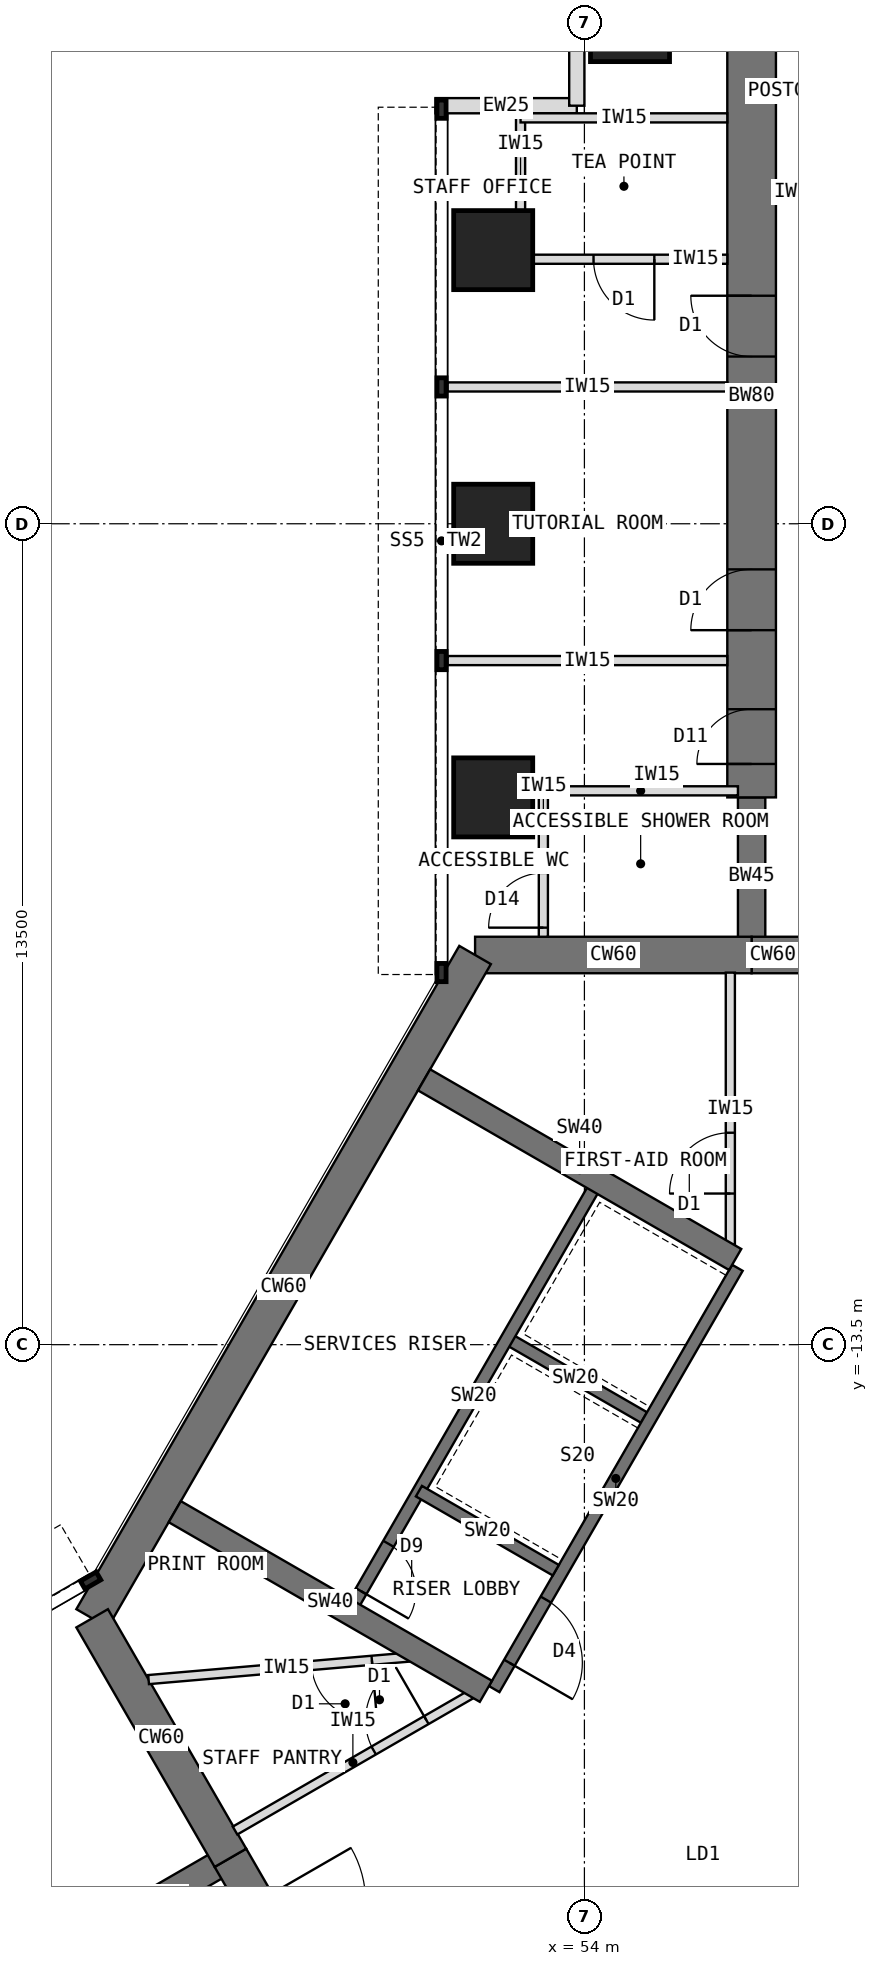
"""IFC4 building model, lengths in metres.
Left out: names, types, materials, properties, quantities, classifications, styles, units other than length and angle.
Written with IfcOpenShell. Run it as: python <this file> out.ifc"""

import sys

from ifc_helpers import new_model, si_unit, direction, frame, frame_2d, origin, origin_2d, place, context, subcontext, project, spatial, rectangle, extrude, element, fill, save


model = new_model("IFC4")
c1 = context("Model", 3, precision=1e-05, world=origin(), true_north=direction((0.0, 1.0)))
c2 = subcontext(c1, "Body", "Model", "MODEL_VIEW")
j1 = project(units=[si_unit("LENGTHUNIT", "METRE"), si_unit("PLANEANGLEUNIT", "RADIAN")], contexts=[c1])
p1 = place(None, origin())
s1 = spatial("IfcSite", under=j1, at=p1, CompositionType="ELEMENT")
p2 = place(p1, origin())
s2 = spatial("IfcBuilding", under=s1, at=p2, CompositionType="ELEMENT")
p3 = place(p2, frame((0.0, 0.0, 133.5)))
s3 = spatial("IfcBuildingStorey", under=s2, at=p3, CompositionType="ELEMENT", Elevation=133.5)
p4 = place(p3, frame((60.25, -7.092, 0.0), z_axis=(0.0, 0.0, 1.0), x_axis=(-1.0, 0.0, 0.0)))
e1 = element("IfcWall", 1, at=p4, inside=s3, PredefinedType="SHEAR", context=c2, shape_type="SweptSolid", body=[
    extrude(rectangle(XDim=3.5, YDim=0.6, at=frame_2d((1.75, 0.0))), origin(), (0.0, 0.0, 1.0), 4.0),
])
p5 = place(p4, frame((0.85, 0.0, 0.0)))
e2 = element("IfcOpeningElement", 2, at=p5, cuts=e1, PredefinedType="OPENING", context=c2, shape_type="SweptSolid", body=[
    extrude(rectangle(XDim=1.8, YDim=2.1, at=frame_2d((0.9, 1.05))), frame((0.0, 0.31, 0.0), z_axis=(0.0, -1.0, 0.0), x_axis=(1.0, 0.0, 0.0)), (0.0, 0.0, 1.0), 0.62),
])
p6 = place(p3, frame((56.75, -7.092, 0.0), z_axis=(0.0, 0.0, 1.0), x_axis=(-1.0, 0.0, 0.0)))
e3 = element("IfcWall", 3, at=p6, inside=s3, PredefinedType="SHEAR", context=c2, shape_type="SweptSolid", body=[
    extrude(rectangle(XDim=4.548, YDim=0.6, at=frame_2d((2.274, 0.0))), origin(), (0.0, 0.0, 1.0), 4.0),
])
p7 = place(p3, frame((52.202, -7.092, 0.0), z_axis=(0.0, 0.0, 1.0), x_axis=(-0.500005998175, -0.866021940709, 0.0)))
e4 = element("IfcWall", 4, at=p7, inside=s3, PredefinedType="SHEAR", context=c2, shape_type="SweptSolid", body=[
    extrude(rectangle(XDim=12.596, YDim=0.6, at=frame_2d((6.298, 0.0))), origin(), (0.0, 0.0, 1.0), 4.0),
])
p8 = place(p3, frame((45.904, -18.0, 0.0), z_axis=(0.0, 0.0, 1.0), x_axis=(0.500024481964, -0.866011268655, 0.0)))
e5 = element("IfcWall", 5, at=p8, inside=s3, PredefinedType="SHEAR", context=c2, shape_type="SweptSolid", body=[
    extrude(rectangle(XDim=4.548, YDim=0.6, at=frame_2d((2.274, 0.0))), origin(), (0.0, 0.0, 1.0), 4.0),
])
p9 = place(p3, frame((48.178, -21.939, 0.0), z_axis=(0.0, 0.0, 1.0), x_axis=(0.500010275428, -0.866019471182, 0.0)))
e6 = element("IfcWall", 6, at=p9, inside=s3, PredefinedType="SHEAR", context=c2, shape_type="SweptSolid", body=[
    extrude(rectangle(XDim=3.5, YDim=0.6, at=frame_2d((1.75, 0.0))), origin(), (0.0, 0.0, 1.0), 4.0),
])
p10 = place(p9, frame((0.85, 0.0, 0.0)))
e7 = element("IfcOpeningElement", 7, at=p10, cuts=e6, PredefinedType="OPENING", context=c2, shape_type="SweptSolid", body=[
    extrude(rectangle(XDim=1.8, YDim=2.1, at=frame_2d((0.9, 1.05))), frame((0.0, 0.31, 0.0), z_axis=(0.0, -1.0, 0.0), x_axis=(1.0, 0.0, 0.0)), (0.0, 0.0, 1.0), 0.62),
])
p11 = place(p3, frame((56.75, -7.092, 0.0), z_axis=(0.0, 0.0, 1.0), x_axis=(0.0, 1.0, 0.0)))
e8 = element("IfcWall", 8, at=p11, inside=s3, PredefinedType="SHEAR", context=c2, shape_type="SweptSolid", body=[
    extrude(rectangle(XDim=2.592, YDim=0.45, at=frame_2d((1.296, 0.0))), origin(), (0.0, 0.0, 1.0), 4.0),
])
p12 = place(p3, frame((56.75, -4.5, 0.0), z_axis=(0.0, 0.0, 1.0), x_axis=(0.0, 1.0, 0.0)))
e9 = element("IfcWall", 9, at=p12, inside=s3, PredefinedType="SHEAR", context=c2, shape_type="SweptSolid", body=[
    extrude(rectangle(XDim=13.2, YDim=0.8, at=frame_2d((6.6, 0.0))), origin(), (0.0, 0.0, 1.0), 4.0),
])
p13 = place(p12, frame((0.55, 0.0, 0.0)))
e10 = element("IfcOpeningElement", 10, at=p13, cuts=e9, PredefinedType="OPENING", context=c2, shape_type="SweptSolid", body=[
    extrude(rectangle(XDim=0.9, YDim=2.1, at=frame_2d((0.45, 1.05))), frame((0.0, 0.41, 0.0), z_axis=(0.0, -1.0, 0.0), x_axis=(1.0, 0.0, 0.0)), (0.0, 0.0, 1.0), 0.82),
])
p14 = place(p12, frame((2.75, 0.0, 0.0)))
e11 = element("IfcOpeningElement", 11, at=p14, cuts=e9, PredefinedType="OPENING", context=c2, shape_type="SweptSolid", body=[
    extrude(rectangle(XDim=1.0, YDim=2.1, at=frame_2d((0.5, 1.05))), frame((0.0, 0.41, 0.0), z_axis=(0.0, -1.0, 0.0), x_axis=(1.0, 0.0, 0.0)), (0.0, 0.0, 1.0), 0.82),
])
p15 = place(p12, frame((7.25, 0.0, 0.0)))
e12 = element("IfcOpeningElement", 12, at=p15, cuts=e9, PredefinedType="OPENING", context=c2, shape_type="SweptSolid", body=[
    extrude(rectangle(XDim=1.0, YDim=2.1, at=frame_2d((0.5, 1.05))), frame((0.0, 0.41, 0.0), z_axis=(0.0, -1.0, 0.0), x_axis=(1.0, 0.0, 0.0)), (0.0, 0.0, 1.0), 0.82),
])
p16 = place(p3, frame((48.178, -21.939, 0.0), z_axis=(0.0, 0.0, 1.0), x_axis=(-0.866072649678, -0.499918158782, 0.0)))
e13 = element("IfcWall", 13, at=p16, inside=s3, PredefinedType="SHEAR", context=c2, shape_type="SweptSolid", body=[
    extrude(rectangle(XDim=2.592, YDim=0.45, at=frame_2d((1.296, 0.0))), origin(), (0.0, 0.0, 1.0), 4.0),
])
for number, where, z_axis, x_axis in (
    (14, (52.5, -4.5, 0.0), (0.0, 0.0, 1.0), (1.0, 0.0, 0.0)),
    (15, (52.5, 0.0, 0.0), (0.0, 0.0, 1.0), (1.0, 0.0, 0.0)),
    (16, (52.5, 4.5, 0.0), (0.0, 0.0, 1.0), (1.0, 0.0, 0.0)),
    (17, (54.75, 8.25, 0.0), (0.0, 0.0, 1.0), (1.0, 0.0, 0.0)),
):
    element("IfcColumn", number, at=place(p3, frame(where, z_axis=z_axis, x_axis=x_axis)), inside=s3, PredefinedType="COLUMN", context=c2, shape_type="SweptSolid", body=[
        extrude(rectangle(XDim=1.3, YDim=1.3, at=origin_2d()), origin(), (0.0, 0.0, 1.0), 4.0),
    ])
for number, where, z_axis, x_axis in (
    (18, (51.55, 6.875, 0.0), (0.0, 0.0, 1.0), (1.0, 0.0, 0.0)),
    (19, (53.875, 6.875, 0.0), (0.0, 0.0, 1.0), (0.0, 1.0, 0.0)),
):
    element("IfcWall", number, at=place(p3, frame(where, z_axis=z_axis, x_axis=x_axis)), inside=s3, PredefinedType="STANDARD", context=c2, shape_type="SweptSolid", body=[
        extrude(rectangle(XDim=2.325, YDim=0.25, at=frame_2d((1.163, 0.0))), origin(), (0.0, 0.0, 1.0), 3.8),
    ])
p17 = place(p3, frame((56.516, -12.236, 0.0), z_axis=(0.0, 0.0, 1.0), x_axis=(-0.49999894854, -0.866026010844, 0.0)))
e20 = element("IfcWall", 20, at=p17, inside=s3, PredefinedType="SHEAR", context=c2, shape_type="SweptSolid", body=[
    extrude(rectangle(XDim=8.0, YDim=0.2, at=frame_2d((4.0, 0.0))), origin(), (0.0, 0.0, 1.0), 4.0),
])
p18 = place(p17, frame((6.3, 0.0, 0.0)))
e21 = element("IfcOpeningElement", 21, at=p18, cuts=e20, PredefinedType="OPENING", context=c2, shape_type="SweptSolid", body=[
    extrude(rectangle(XDim=1.2, YDim=2.1, at=frame_2d((0.6, 1.05))), frame((0.0, 0.11, 0.0), z_axis=(0.0, -1.0, 0.0), x_axis=(1.0, 0.0, 0.0)), (0.0, 0.0, 1.0), 0.22),
])
for number, where, z_axis, x_axis in (
    (22, (54.98, -14.697, 0.0), (0.0, 0.0, 1.0), (-0.866, 0.5, 0.0)),
    (23, (53.53, -17.209, 0.0), (0.0, 0.0, 1.0), (-0.866, 0.5, 0.0)),
):
    element("IfcWall", number, at=place(p3, frame(where, z_axis=z_axis, x_axis=x_axis)), inside=s3, PredefinedType="SHEAR", context=c2, shape_type="SweptSolid", body=[
        extrude(rectangle(XDim=2.6, YDim=0.2, at=frame_2d((1.3, 0.0))), origin(), (0.0, 0.0, 1.0), 4.0),
    ])
p19 = place(p3, frame((54.178, -10.886, 0.0), z_axis=(0.0, 0.0, 1.0), x_axis=(-0.49999894854, -0.866026010844, 0.0)))
e24 = element("IfcWall", 24, at=p19, inside=s3, PredefinedType="SHEAR", context=c2, shape_type="SweptSolid", body=[
    extrude(rectangle(XDim=8.0, YDim=0.2, at=frame_2d((4.0, 0.0))), origin(), (0.0, 0.0, 1.0), 4.0),
])
p20 = place(p19, frame((6.8, 0.0, 0.0)))
e25 = element("IfcOpeningElement", 25, at=p20, cuts=e24, PredefinedType="OPENING", context=c2, shape_type="SweptSolid", body=[
    extrude(rectangle(XDim=0.9, YDim=2.1, at=frame_2d((0.45, 1.05))), frame((0.0, 0.11, 0.0), z_axis=(0.0, -1.0, 0.0), x_axis=(1.0, 0.0, 0.0)), (0.0, 0.0, 1.0), 0.22),
])
p21 = place(p3, frame((52.38, -19.201, 0.0), z_axis=(0.0, 0.0, 1.0), x_axis=(-0.866027317282, 0.49999668571, 0.0)))
e26 = element("IfcWall", 26, at=p21, inside=s3, PredefinedType="SHEAR", context=c2, shape_type="SweptSolid", body=[
    extrude(rectangle(XDim=5.908, YDim=0.4, at=frame_2d((2.954, 0.0))), origin(), (0.0, 0.0, 1.0), 4.0),
])
p22 = place(p3, frame((56.48, -12.099, 0.0), z_axis=(0.0, 0.0, 1.0), x_axis=(-0.866009424208, 0.500027676417, 0.0)))
e27 = element("IfcWall", 27, at=p22, inside=s3, PredefinedType="SHEAR", context=c2, shape_type="SweptSolid", body=[
    extrude(rectangle(XDim=5.908, YDim=0.4, at=frame_2d((2.954, 0.0))), origin(), (0.0, 0.0, 1.0), 4.0),
])
for number, where, z_axis, x_axis in (
    (28, (56.35, -2.25, 0.0), (0.0, 0.0, 1.0), (-1.0, 0.0, 0.0)),
    (29, (56.35, 2.25, 0.0), (0.0, 0.0, 1.0), (-1.0, 0.0, 0.0)),
):
    element("IfcWall", number, at=place(p3, frame(where, z_axis=z_axis, x_axis=x_axis)), inside=s3, PredefinedType="PARTITIONING", context=c2, shape_type="SweptSolid", body=[
        extrude(rectangle(XDim=4.6, YDim=0.15, at=frame_2d((2.3, 0.0))), origin(), (0.0, 0.0, 1.0), 3.8),
    ])
p23 = place(p3, frame((52.95, 4.35, 0.0), z_axis=(0.0, 0.0, 1.0), x_axis=(0.0, 1.0, 0.0)))
e30 = element("IfcWall", 30, at=p23, inside=s3, PredefinedType="PARTITIONING", context=c2, shape_type="SweptSolid", body=[
    extrude(rectangle(XDim=2.4, YDim=0.15, at=frame_2d((1.2, 0.0))), origin(), (0.0, 0.0, 1.0), 3.8),
])
p24 = place(p3, frame((56.35, 4.35, 0.0), z_axis=(0.0, 0.0, 1.0), x_axis=(-1.0, 0.0, 0.0)))
e31 = element("IfcWall", 31, at=p24, inside=s3, PredefinedType="PARTITIONING", context=c2, shape_type="SweptSolid", body=[
    extrude(rectangle(XDim=3.4, YDim=0.15, at=frame_2d((1.7, 0.0))), origin(), (0.0, 0.0, 1.0), 3.8),
])
p25 = place(p24, frame((1.2, 0.0, 0.0)))
e32 = element("IfcOpeningElement", 32, at=p25, cuts=e31, PredefinedType="OPENING", context=c2, shape_type="SweptSolid", body=[
    extrude(rectangle(XDim=1.0, YDim=2.1, at=frame_2d((0.5, 1.05))), frame((0.0, 0.085, 0.0), z_axis=(0.0, -1.0, 0.0), x_axis=(1.0, 0.0, 0.0)), (0.0, 0.0, 1.0), 0.17),
])
p26 = place(p3, frame((56.35, 6.675, 0.0), z_axis=(0.0, 0.0, 1.0), x_axis=(-1.0, 0.0, 0.0)))
e33 = element("IfcWall", 33, at=p26, inside=s3, PredefinedType="PARTITIONING", context=c2, shape_type="SweptSolid", body=[
    extrude(rectangle(XDim=3.4, YDim=0.15, at=frame_2d((1.7, 0.0))), origin(), (0.0, 0.0, 1.0), 3.8),
])
p27 = place(p3, frame((53.325, -6.792, 0.0), z_axis=(0.0, 0.0, 1.0), x_axis=(0.0, 1.0, 0.0)))
e34 = element("IfcWall", 34, at=p27, inside=s3, PredefinedType="PARTITIONING", context=c2, shape_type="SweptSolid", body=[
    extrude(rectangle(XDim=2.4, YDim=0.15, at=frame_2d((1.2, 0.0))), origin(), (0.0, 0.0, 1.0), 3.8),
])
p28 = place(p27, frame((0.15, 0.0, 0.0)))
e35 = element("IfcOpeningElement", 35, at=p28, cuts=e34, PredefinedType="OPENING", context=c2, shape_type="SweptSolid", body=[
    extrude(rectangle(XDim=0.9, YDim=2.1, at=frame_2d((0.45, 1.05))), frame((0.0, 0.085, 0.0), z_axis=(0.0, -1.0, 0.0), x_axis=(1.0, 0.0, 0.0)), (0.0, 0.0, 1.0), 0.17),
])
p29 = place(p3, frame((56.525, -4.392, 0.0), z_axis=(0.0, 0.0, 1.0), x_axis=(-1.0, 0.0, 0.0)))
e36 = element("IfcWall", 36, at=p29, inside=s3, PredefinedType="PARTITIONING", context=c2, shape_type="SweptSolid", body=[
    extrude(rectangle(XDim=3.2, YDim=0.15, at=frame_2d((1.6, 0.0))), origin(), (0.0, 0.0, 1.0), 3.8),
])
p30 = place(p3, frame((48.254, -21.49, 0.0), z_axis=(0.0, 0.0, 1.0), x_axis=(0.866025707867, 0.499999473313, 0.0)))
e37 = element("IfcWall", 37, at=p30, inside=s3, PredefinedType="PARTITIONING", context=c2, shape_type="SweptSolid", body=[
    extrude(rectangle(XDim=4.476, YDim=0.15, at=frame_2d((2.238, 0.0))), origin(), (0.0, 0.0, 1.0), 3.8),
])
p31 = place(p30, frame((2.633, 0.0, 0.0)))
e38 = element("IfcOpeningElement", 38, at=p31, cuts=e37, PredefinedType="OPENING", context=c2, shape_type="SweptSolid", body=[
    extrude(rectangle(XDim=1.0, YDim=2.1, at=frame_2d((0.5, 1.05))), frame((0.0, 0.085, 0.0), z_axis=(0.0, -1.0, 0.0), x_axis=(1.0, 0.0, 0.0)), (0.0, 0.0, 1.0), 0.17),
])
p32 = place(p3, frame((56.4, -11.857, 0.0), z_axis=(0.0, 0.0, 1.0), x_axis=(0.0, 1.0, 0.0)))
e39 = element("IfcWall", 39, at=p32, inside=s3, PredefinedType="PARTITIONING", context=c2, shape_type="SweptSolid", body=[
    extrude(rectangle(XDim=4.476, YDim=0.15, at=frame_2d((2.238, 0.0))), origin(), (0.0, 0.0, 1.0), 3.8),
])
p33 = place(p32, frame((0.843, 0.0, 0.0)))
e40 = element("IfcOpeningElement", 40, at=p33, cuts=e39, PredefinedType="OPENING", context=c2, shape_type="SweptSolid", body=[
    extrude(rectangle(XDim=1.0, YDim=2.1, at=frame_2d((0.5, 1.05))), frame((0.0, 0.085, 0.0), z_axis=(0.0, -1.0, 0.0), x_axis=(1.0, 0.0, 0.0)), (0.0, 0.0, 1.0), 0.17),
])
p34 = place(p3, frame((51.367, -18.616, 0.0), z_axis=(0.0, 0.0, 1.0), x_axis=(-0.996291540593, -0.086041653535, 0.0)))
e41 = element("IfcWall", 41, at=p34, inside=s3, PredefinedType="PARTITIONING", context=c2, shape_type="SweptSolid", body=[
    extrude(rectangle(XDim=4.551, YDim=0.15, at=frame_2d((2.276, 0.0))), origin(), (0.0, 0.0, 1.0), 3.8),
])
p35 = place(p34, frame((0.865, 0.0, 0.0)))
e42 = element("IfcOpeningElement", 42, at=p35, cuts=e41, PredefinedType="OPENING", context=c2, shape_type="SweptSolid", body=[
    extrude(rectangle(XDim=1.0, YDim=2.1, at=frame_2d((0.5, 1.05))), frame((0.0, 0.085, 0.0), z_axis=(0.0, -1.0, 0.0), x_axis=(1.0, 0.0, 0.0)), (0.0, 0.0, 1.0), 0.17),
])
p36 = place(p3, frame((59.85, 5.45, 0.0), z_axis=(0.0, 0.0, 1.0), x_axis=(-1.0, 0.0, 0.0)))
e43 = element("IfcWall", 43, at=p36, inside=s3, PredefinedType="PARTITIONING", context=c2, shape_type="SweptSolid", body=[
    extrude(rectangle(XDim=2.7, YDim=0.15, at=frame_2d((1.35, 0.0))), origin(), (0.0, 0.0, 1.0), 3.8),
])
p37 = place(p36, frame((0.85, 0.0, 0.0)))
e44 = element("IfcOpeningElement", 44, at=p37, cuts=e43, PredefinedType="OPENING", context=c2, shape_type="SweptSolid", body=[
    extrude(rectangle(XDim=1.0, YDim=2.1, at=frame_2d((0.5, 1.05))), frame((0.0, 0.085, 0.0), z_axis=(0.0, -1.0, 0.0), x_axis=(1.0, 0.0, 0.0)), (0.0, 0.0, 1.0), 0.17),
])
p38 = place(p18, origin())
e45 = element("IfcDoor", 45, at=p38, inside=s3, OperationType="SINGLE_SWING_RIGHT", PredefinedType="DOOR", context=c2, shape_type="SweptSolid", body=[
    extrude(rectangle(XDim=1.2, YDim=2.1, at=frame_2d((0.6, 1.05))), frame((0.0, 0.025, 0.0), z_axis=(0.0, -1.0, 0.0), x_axis=(1.0, 0.0, 0.0)), (0.0, 0.0, 1.0), 0.05),
])
fill(e21, e45)
p39 = place(p20, origin())
e46 = element("IfcDoor", 46, at=p39, inside=s3, OperationType="SINGLE_SWING_RIGHT", PredefinedType="DOOR", context=c2, shape_type="SweptSolid", body=[
    extrude(rectangle(XDim=0.9, YDim=2.1, at=frame_2d((0.45, 1.05))), frame((0.0, 0.025, 0.0), z_axis=(0.0, -1.0, 0.0), x_axis=(1.0, 0.0, 0.0)), (0.0, 0.0, 1.0), 0.05),
])
fill(e25, e46)
p40 = place(p25, origin())
e47 = element("IfcDoor", 47, at=p40, inside=s3, OperationType="SINGLE_SWING_LEFT", PredefinedType="DOOR", context=c2, shape_type="SweptSolid", body=[
    extrude(rectangle(XDim=1.0, YDim=2.1, at=frame_2d((0.5, 1.05))), frame((0.0, 0.025, 0.0), z_axis=(0.0, -1.0, 0.0), x_axis=(1.0, 0.0, 0.0)), (0.0, 0.0, 1.0), 0.05),
])
fill(e32, e47)
p41 = place(p28, origin())
e48 = element("IfcDoor", 48, at=p41, inside=s3, OperationType="SINGLE_SWING_LEFT", PredefinedType="DOOR", context=c2, shape_type="SweptSolid", body=[
    extrude(rectangle(XDim=0.9, YDim=2.1, at=frame_2d((0.45, 1.05))), frame((0.0, 0.025, 0.0), z_axis=(0.0, -1.0, 0.0), x_axis=(1.0, 0.0, 0.0)), (0.0, 0.0, 1.0), 0.05),
])
fill(e35, e48)
p42 = place(p35, origin())
e49 = element("IfcDoor", 49, at=p42, inside=s3, OperationType="SINGLE_SWING_LEFT", PredefinedType="DOOR", context=c2, shape_type="SweptSolid", body=[
    extrude(rectangle(XDim=1.0, YDim=2.1, at=frame_2d((0.5, 1.05))), frame((0.0, 0.025, 0.0), z_axis=(0.0, -1.0, 0.0), x_axis=(1.0, 0.0, 0.0)), (0.0, 0.0, 1.0), 0.05),
])
fill(e42, e49)
p43 = place(p31, origin())
e50 = element("IfcDoor", 50, at=p43, inside=s3, OperationType="SINGLE_SWING_RIGHT", PredefinedType="DOOR", context=c2, shape_type="SweptSolid", body=[
    extrude(rectangle(XDim=1.0, YDim=2.1, at=frame_2d((0.5, 1.05))), frame((0.0, 0.025, 0.0), z_axis=(0.0, -1.0, 0.0), x_axis=(1.0, 0.0, 0.0)), (0.0, 0.0, 1.0), 0.05),
])
fill(e38, e50)
p44 = place(p33, origin())
e51 = element("IfcDoor", 51, at=p44, inside=s3, OperationType="SINGLE_SWING_LEFT", PredefinedType="DOOR", context=c2, shape_type="SweptSolid", body=[
    extrude(rectangle(XDim=1.0, YDim=2.1, at=frame_2d((0.5, 1.05))), frame((0.0, 0.025, 0.0), z_axis=(0.0, -1.0, 0.0), x_axis=(1.0, 0.0, 0.0)), (0.0, 0.0, 1.0), 0.05),
])
fill(e40, e51)
p45 = place(p13, origin())
e52 = element("IfcDoor", 52, at=p45, inside=s3, OperationType="SINGLE_SWING_LEFT", PredefinedType="DOOR", context=c2, shape_type="SweptSolid", body=[
    extrude(rectangle(XDim=0.82, YDim=2.06, at=frame_2d((0.45, 1.03))), frame((0.0, 0.025, 0.0), z_axis=(0.0, -1.0, 0.0), x_axis=(1.0, 0.0, 0.0)), (0.0, 0.0, 1.0), 0.05),
    extrude(rectangle(XDim=0.04, YDim=2.1, at=frame_2d((0.02, 1.05))), frame((0.0, 0.4, 0.0), z_axis=(0.0, -1.0, 0.0), x_axis=(1.0, 0.0, 0.0)), (0.0, 0.0, 1.0), 0.8),
    extrude(rectangle(XDim=0.04, YDim=2.1, at=frame_2d((0.88, 1.05))), frame((0.0, 0.4, 0.0), z_axis=(0.0, -1.0, 0.0), x_axis=(1.0, 0.0, 0.0)), (0.0, 0.0, 1.0), 0.8),
    extrude(rectangle(XDim=0.82, YDim=0.04, at=frame_2d((0.45, 2.08))), frame((0.0, 0.4, 0.0), z_axis=(0.0, -1.0, 0.0), x_axis=(1.0, 0.0, 0.0)), (0.0, 0.0, 1.0), 0.8),
])
fill(e10, e52)
p46 = place(p14, origin())
e53 = element("IfcDoor", 53, at=p46, inside=s3, OperationType="SINGLE_SWING_LEFT", PredefinedType="DOOR", context=c2, shape_type="SweptSolid", body=[
    extrude(rectangle(XDim=0.92, YDim=2.06, at=frame_2d((0.5, 1.03))), frame((0.0, 0.025, 0.0), z_axis=(0.0, -1.0, 0.0), x_axis=(1.0, 0.0, 0.0)), (0.0, 0.0, 1.0), 0.05),
    extrude(rectangle(XDim=0.04, YDim=2.1, at=frame_2d((0.02, 1.05))), frame((0.0, 0.4, 0.0), z_axis=(0.0, -1.0, 0.0), x_axis=(1.0, 0.0, 0.0)), (0.0, 0.0, 1.0), 0.8),
    extrude(rectangle(XDim=0.04, YDim=2.1, at=frame_2d((0.98, 1.05))), frame((0.0, 0.4, 0.0), z_axis=(0.0, -1.0, 0.0), x_axis=(1.0, 0.0, 0.0)), (0.0, 0.0, 1.0), 0.8),
    extrude(rectangle(XDim=0.92, YDim=0.04, at=frame_2d((0.5, 2.08))), frame((0.0, 0.4, 0.0), z_axis=(0.0, -1.0, 0.0), x_axis=(1.0, 0.0, 0.0)), (0.0, 0.0, 1.0), 0.8),
])
fill(e11, e53)
p47 = place(p15, origin())
e54 = element("IfcDoor", 54, at=p47, inside=s3, OperationType="SINGLE_SWING_RIGHT", PredefinedType="DOOR", context=c2, shape_type="SweptSolid", body=[
    extrude(rectangle(XDim=0.92, YDim=2.06, at=frame_2d((0.5, 1.03))), frame((0.0, 0.025, 0.0), z_axis=(0.0, -1.0, 0.0), x_axis=(1.0, 0.0, 0.0)), (0.0, 0.0, 1.0), 0.05),
    extrude(rectangle(XDim=0.04, YDim=2.1, at=frame_2d((0.02, 1.05))), frame((0.0, 0.4, 0.0), z_axis=(0.0, -1.0, 0.0), x_axis=(1.0, 0.0, 0.0)), (0.0, 0.0, 1.0), 0.8),
    extrude(rectangle(XDim=0.04, YDim=2.1, at=frame_2d((0.98, 1.05))), frame((0.0, 0.4, 0.0), z_axis=(0.0, -1.0, 0.0), x_axis=(1.0, 0.0, 0.0)), (0.0, 0.0, 1.0), 0.8),
    extrude(rectangle(XDim=0.92, YDim=0.04, at=frame_2d((0.5, 2.08))), frame((0.0, 0.4, 0.0), z_axis=(0.0, -1.0, 0.0), x_axis=(1.0, 0.0, 0.0)), (0.0, 0.0, 1.0), 0.8),
])
fill(e12, e54)
save(model, sys.argv[1])
